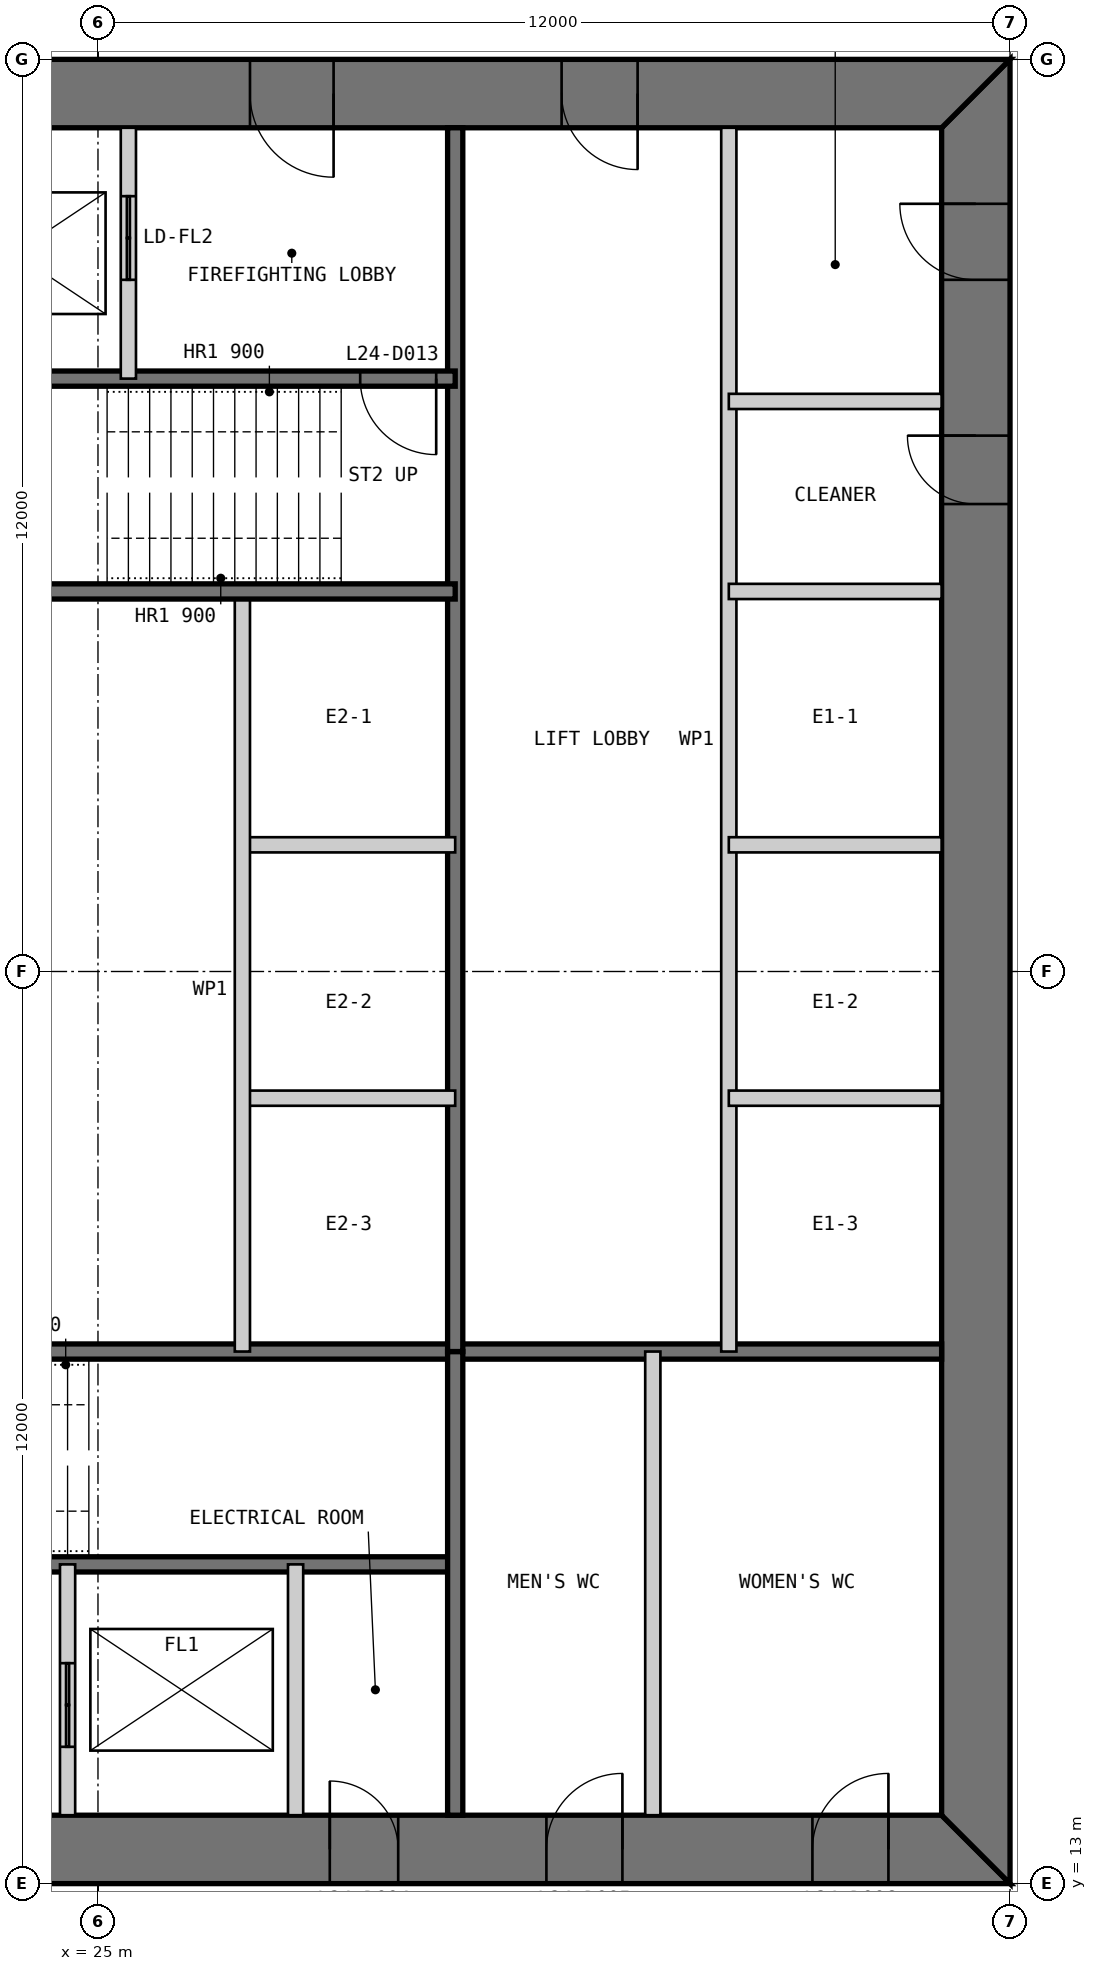
"""IFC4 building model, lengths in metres.
Left out: names, types, materials, properties, quantities, classifications, styles, units other than length and angle.
Written with IfcOpenShell. Run it as: python <this file> out.ifc"""

import sys

from ifc_helpers import new_model, si_unit, direction, frame, frame_2d, origin, place, context, subcontext, project, spatial, polyline, rectangle, outline, extrude, element, fill, save


model = new_model("IFC4")
c1 = context("Model", 3, precision=1e-05, world=origin(), true_north=direction((0.0, 1.0)))
c2 = subcontext(c1, "Body", "Model", "MODEL_VIEW")
j1 = project(units=[si_unit("LENGTHUNIT", "METRE"), si_unit("PLANEANGLEUNIT", "RADIAN")], contexts=[c1])
p1 = place(None, origin())
s1 = spatial("IfcSite", under=j1, at=p1, CompositionType="ELEMENT")
p2 = place(p1, origin())
s2 = spatial("IfcBuilding", under=s1, at=p2, CompositionType="ELEMENT")
p3 = place(p2, frame((0.0, 0.0, 106.4)))
s3 = spatial("IfcBuildingStorey", under=s2, at=p3, CompositionType="ELEMENT", Elevation=106.4)
p4 = place(p3, frame((13.0, 13.45, 0.0), z_axis=(0.0, 0.0, 1.0), x_axis=(1.0, 0.0, 0.0)))
e1 = element("IfcWall", 1, at=p4, inside=s3, PredefinedType="SHEAR", context=c2, shape_type="SweptSolid", body=[
    extrude(outline(polyline([(0.0, -0.45), (24.0, -0.45), (23.1, 0.45), (0.9, 0.45), (0.0, -0.45)])), origin(), (0.0, 0.0, 1.0), 4.0),
])
p5 = place(p4, frame((4.9, 0.0, 0.0)))
e2 = element("IfcOpeningElement", 2, at=p5, cuts=e1, PredefinedType="OPENING", context=c2, shape_type="SweptSolid", body=[
    extrude(rectangle(XDim=1.0, YDim=2.2, at=frame_2d((0.5, 1.1))), frame((0.0, 0.46, 0.0), z_axis=(0.0, -1.0, 0.0), x_axis=(1.0, 0.0, 0.0)), (0.0, 0.0, 1.0), 0.92),
])
p6 = place(p4, frame((8.9, 0.0, 0.0)))
e3 = element("IfcOpeningElement", 3, at=p6, cuts=e1, PredefinedType="OPENING", context=c2, shape_type="SweptSolid", body=[
    extrude(rectangle(XDim=1.1, YDim=2.2, at=frame_2d((0.55, 1.1))), frame((0.0, 0.46, 0.0), z_axis=(0.0, -1.0, 0.0), x_axis=(1.0, 0.0, 0.0)), (0.0, 0.0, 1.0), 0.92),
])
p7 = place(p4, frame((15.05, 0.0, 0.0)))
e4 = element("IfcOpeningElement", 4, at=p7, cuts=e1, PredefinedType="OPENING", context=c2, shape_type="SweptSolid", body=[
    extrude(rectangle(XDim=0.9, YDim=2.2, at=frame_2d((0.45, 1.1))), frame((0.0, 0.46, 0.0), z_axis=(0.0, -1.0, 0.0), x_axis=(1.0, 0.0, 0.0)), (0.0, 0.0, 1.0), 0.92),
])
p8 = place(p4, frame((17.9, 0.0, 0.0)))
e5 = element("IfcOpeningElement", 5, at=p8, cuts=e1, PredefinedType="OPENING", context=c2, shape_type="SweptSolid", body=[
    extrude(rectangle(XDim=1.0, YDim=2.2, at=frame_2d((0.5, 1.1))), frame((0.0, 0.46, 0.0), z_axis=(0.0, -1.0, 0.0), x_axis=(1.0, 0.0, 0.0)), (0.0, 0.0, 1.0), 0.92),
])
p9 = place(p4, frame((21.4, 0.0, 0.0)))
e6 = element("IfcOpeningElement", 6, at=p9, cuts=e1, PredefinedType="OPENING", context=c2, shape_type="SweptSolid", body=[
    extrude(rectangle(XDim=1.0, YDim=2.2, at=frame_2d((0.5, 1.1))), frame((0.0, 0.46, 0.0), z_axis=(0.0, -1.0, 0.0), x_axis=(1.0, 0.0, 0.0)), (0.0, 0.0, 1.0), 0.92),
])
p10 = place(p3, frame((36.55, 13.9, 0.0), z_axis=(0.0, 0.0, 1.0), x_axis=(0.0, 1.0, 0.0)))
e7 = element("IfcWall", 7, at=p10, inside=s3, PredefinedType="SHEAR", context=c2, shape_type="SweptSolid", body=[
    extrude(outline(polyline([(-0.9, -0.45), (23.1, -0.45), (22.2, 0.45), (0.0, 0.45), (-0.9, -0.45)])), origin(), (0.0, 0.0, 1.0), 4.0),
])
p11 = place(p10, frame((20.2, 0.0, 0.0)))
e8 = element("IfcOpeningElement", 8, at=p11, cuts=e7, PredefinedType="OPENING", context=c2, shape_type="SweptSolid", body=[
    extrude(rectangle(XDim=1.0, YDim=2.2, at=frame_2d((0.5, 1.1))), frame((0.0, 0.46, 0.0), z_axis=(0.0, -1.0, 0.0), x_axis=(1.0, 0.0, 0.0)), (0.0, 0.0, 1.0), 0.92),
])
p12 = place(p10, frame((17.25, 0.0, 0.0)))
e9 = element("IfcOpeningElement", 9, at=p12, cuts=e7, PredefinedType="OPENING", context=c2, shape_type="SweptSolid", body=[
    extrude(rectangle(XDim=0.9, YDim=2.2, at=frame_2d((0.45, 1.1))), frame((0.0, 0.46, 0.0), z_axis=(0.0, -1.0, 0.0), x_axis=(1.0, 0.0, 0.0)), (0.0, 0.0, 1.0), 0.92),
])
p13 = place(p3, frame((37.0, 36.55, 0.0), z_axis=(0.0, 0.0, 1.0), x_axis=(-1.0, 0.0, 0.0)))
e10 = element("IfcWall", 10, at=p13, inside=s3, PredefinedType="SHEAR", context=c2, shape_type="SweptSolid", body=[
    extrude(outline(polyline([(0.0, -0.45), (24.0, -0.45), (23.1, 0.45), (0.9, 0.45), (0.0, -0.45)])), origin(), (0.0, 0.0, 1.0), 4.0),
])
p14 = place(p13, frame((4.9, 0.0, 0.0)))
e11 = element("IfcOpeningElement", 11, at=p14, cuts=e10, PredefinedType="OPENING", context=c2, shape_type="SweptSolid", body=[
    extrude(rectangle(XDim=1.0, YDim=2.2, at=frame_2d((0.5, 1.1))), frame((0.0, 0.46, 0.0), z_axis=(0.0, -1.0, 0.0), x_axis=(1.0, 0.0, 0.0)), (0.0, 0.0, 1.0), 0.92),
])
p15 = place(p13, frame((8.9, 0.0, 0.0)))
e12 = element("IfcOpeningElement", 12, at=p15, cuts=e10, PredefinedType="OPENING", context=c2, shape_type="SweptSolid", body=[
    extrude(rectangle(XDim=1.1, YDim=2.2, at=frame_2d((0.55, 1.1))), frame((0.0, 0.46, 0.0), z_axis=(0.0, -1.0, 0.0), x_axis=(1.0, 0.0, 0.0)), (0.0, 0.0, 1.0), 0.92),
])
p16 = place(p13, frame((15.05, 0.0, 0.0)))
e13 = element("IfcOpeningElement", 13, at=p16, cuts=e10, PredefinedType="OPENING", context=c2, shape_type="SweptSolid", body=[
    extrude(rectangle(XDim=0.9, YDim=2.2, at=frame_2d((0.45, 1.1))), frame((0.0, 0.46, 0.0), z_axis=(0.0, -1.0, 0.0), x_axis=(1.0, 0.0, 0.0)), (0.0, 0.0, 1.0), 0.92),
])
p17 = place(p13, frame((17.9, 0.0, 0.0)))
e14 = element("IfcOpeningElement", 14, at=p17, cuts=e10, PredefinedType="OPENING", context=c2, shape_type="SweptSolid", body=[
    extrude(rectangle(XDim=1.0, YDim=2.2, at=frame_2d((0.5, 1.1))), frame((0.0, 0.46, 0.0), z_axis=(0.0, -1.0, 0.0), x_axis=(1.0, 0.0, 0.0)), (0.0, 0.0, 1.0), 0.92),
])
p18 = place(p13, frame((21.4, 0.0, 0.0)))
e15 = element("IfcOpeningElement", 15, at=p18, cuts=e10, PredefinedType="OPENING", context=c2, shape_type="SweptSolid", body=[
    extrude(rectangle(XDim=1.0, YDim=2.2, at=frame_2d((0.5, 1.1))), frame((0.0, 0.46, 0.0), z_axis=(0.0, -1.0, 0.0), x_axis=(1.0, 0.0, 0.0)), (0.0, 0.0, 1.0), 0.92),
])
p19 = place(p3, frame((20.3, 17.2, 0.0), z_axis=(0.0, 0.0, 1.0), x_axis=(1.0, 0.0, 0.0)))
e16 = element("IfcWall", 16, at=p19, inside=s3, PredefinedType="SOLIDWALL", context=c2, shape_type="SweptSolid", body=[
    extrude(rectangle(XDim=9.4, YDim=0.2, at=frame_2d((4.7, 0.0))), origin(), (0.0, 0.0, 1.0), 3.8),
])
p20 = place(p19, frame((0.25, 0.0, 0.0)))
e17 = element("IfcOpeningElement", 17, at=p20, cuts=e16, PredefinedType="OPENING", context=c2, shape_type="SweptSolid", body=[
    extrude(rectangle(XDim=1.0, YDim=2.2, at=frame_2d((0.5, 1.1))), frame((0.0, 0.11, 0.0), z_axis=(0.0, -1.0, 0.0), x_axis=(1.0, 0.0, 0.0)), (0.0, 0.0, 1.0), 0.22),
])
p21 = place(p3, frame((20.3, 20.0, 0.0), z_axis=(0.0, 0.0, 1.0), x_axis=(1.0, 0.0, 0.0)))
e18 = element("IfcWall", 18, at=p21, inside=s3, PredefinedType="SOLIDWALL", context=c2, shape_type="SweptSolid", body=[
    extrude(rectangle(XDim=15.8, YDim=0.2, at=frame_2d((7.9, 0.0))), origin(), (0.0, 0.0, 1.0), 3.8),
])
p22 = place(p3, frame((24.6, 13.9, 0.0), z_axis=(0.0, 0.0, 1.0), x_axis=(0.0, 1.0, 0.0)))
e19 = element("IfcWall", 19, at=p22, inside=s3, PredefinedType="PARTITIONING", context=c2, shape_type="SweptSolid", body=[
    extrude(rectangle(XDim=3.3, YDim=0.2, at=frame_2d((1.65, 0.0))), origin(), (0.0, 0.0, 1.0), 3.8),
])
p23 = place(p22, frame((0.9, 0.0, 0.0)))
e20 = element("IfcOpeningElement", 20, at=p23, cuts=e19, PredefinedType="OPENING", context=c2, shape_type="SweptSolid", body=[
    extrude(rectangle(XDim=1.1, YDim=2.2, at=frame_2d((0.55, 1.1))), frame((0.0, 0.11, 0.0), z_axis=(0.0, -1.0, 0.0), x_axis=(1.0, 0.0, 0.0)), (0.0, 0.0, 1.0), 0.22),
])
p24 = place(p3, frame((27.6, 13.9, 0.0), z_axis=(0.0, 0.0, 1.0), x_axis=(0.0, 1.0, 0.0)))
e21 = element("IfcWall", 21, at=p24, inside=s3, PredefinedType="PARTITIONING", context=c2, shape_type="SweptSolid", body=[
    extrude(rectangle(XDim=3.3, YDim=0.2, at=frame_2d((1.65, 0.0))), origin(), (0.0, 0.0, 1.0), 3.8),
])
p25 = place(p3, frame((29.7, 13.9, 0.0), z_axis=(0.0, 0.0, 1.0), x_axis=(0.0, 1.0, 0.0)))
e22 = element("IfcWall", 22, at=p25, inside=s3, PredefinedType="SOLIDWALL", context=c2, shape_type="SweptSolid", body=[
    extrude(rectangle(XDim=6.1, YDim=0.2, at=frame_2d((3.05, 0.0))), origin(), (0.0, 0.0, 1.0), 3.8),
])
p26 = place(p3, frame((32.3, 13.9, 0.0), z_axis=(0.0, 0.0, 1.0), x_axis=(0.0, 1.0, 0.0)))
e23 = element("IfcWall", 23, at=p26, inside=s3, PredefinedType="PARTITIONING", context=c2, shape_type="SweptSolid", body=[
    extrude(rectangle(XDim=6.1, YDim=0.2, at=frame_2d((3.05, 0.0))), origin(), (0.0, 0.0, 1.0), 3.8),
])
p27 = place(p3, frame((33.3, 36.1, 0.0), z_axis=(0.0, 0.0, 1.0), x_axis=(0.0, -1.0, 0.0)))
e24 = element("IfcWall", 24, at=p27, inside=s3, PredefinedType="PARTITIONING", context=c2, shape_type="SweptSolid", body=[
    extrude(rectangle(XDim=16.1, YDim=0.2, at=frame_2d((8.05, 0.0))), origin(), (0.0, 0.0, 1.0), 3.8),
])
p28 = place(p3, frame((29.7, 36.1, 0.0), z_axis=(0.0, 0.0, 1.0), x_axis=(0.0, -1.0, 0.0)))
e25 = element("IfcWall", 25, at=p28, inside=s3, PredefinedType="SOLIDWALL", context=c2, shape_type="SweptSolid", body=[
    extrude(rectangle(XDim=16.1, YDim=0.2, at=frame_2d((8.05, 0.0))), origin(), (0.0, 0.0, 1.0), 3.8),
])
for number, where, z_axis, x_axis in (
    (26, (36.1, 30.0, 0.0), (0.0, 0.0, 1.0), (-1.0, 0.0, 0.0)),
    (27, (36.1, 26.667, 0.0), (0.0, 0.0, 1.0), (-1.0, 0.0, 0.0)),
    (28, (36.1, 23.333, 0.0), (0.0, 0.0, 1.0), (-1.0, 0.0, 0.0)),
    (29, (29.7, 26.667, 0.0), (0.0, 0.0, 1.0), (-1.0, 0.0, 0.0)),
    (30, (29.7, 23.333, 0.0), (0.0, 0.0, 1.0), (-1.0, 0.0, 0.0)),
):
    element("IfcWall", number, at=place(p3, frame(where, z_axis=z_axis, x_axis=x_axis)), inside=s3, PredefinedType="PARTITIONING", context=c2, shape_type="SweptSolid", body=[
        extrude(rectangle(XDim=2.8, YDim=0.2, at=frame_2d((1.4, 0.0))), origin(), (0.0, 0.0, 1.0), 3.8),
    ])
p29 = place(p3, frame((26.9, 30.0, 0.0), z_axis=(0.0, 0.0, 1.0), x_axis=(0.0, -1.0, 0.0)))
e31 = element("IfcWall", 31, at=p29, inside=s3, PredefinedType="PARTITIONING", context=c2, shape_type="SweptSolid", body=[
    extrude(rectangle(XDim=10.0, YDim=0.2, at=frame_2d((5.0, 0.0))), origin(), (0.0, 0.0, 1.0), 3.8),
])
p30 = place(p3, frame((29.7, 32.8, 0.0), z_axis=(0.0, 0.0, 1.0), x_axis=(-1.0, 0.0, 0.0)))
e32 = element("IfcWall", 32, at=p30, inside=s3, PredefinedType="SOLIDWALL", context=c2, shape_type="SweptSolid", body=[
    extrude(rectangle(XDim=9.4, YDim=0.2, at=frame_2d((4.7, 0.0))), origin(), (0.0, 0.0, 1.0), 3.8),
])
p31 = place(p30, frame((0.25, 0.0, 0.0)))
e33 = element("IfcOpeningElement", 33, at=p31, cuts=e32, PredefinedType="OPENING", context=c2, shape_type="SweptSolid", body=[
    extrude(rectangle(XDim=1.0, YDim=2.2, at=frame_2d((0.5, 1.1))), frame((0.0, 0.11, 0.0), z_axis=(0.0, -1.0, 0.0), x_axis=(1.0, 0.0, 0.0)), (0.0, 0.0, 1.0), 0.22),
])
p32 = place(p3, frame((29.7, 30.0, 0.0), z_axis=(0.0, 0.0, 1.0), x_axis=(-1.0, 0.0, 0.0)))
e34 = element("IfcWall", 34, at=p32, inside=s3, PredefinedType="SOLIDWALL", context=c2, shape_type="SweptSolid", body=[
    extrude(rectangle(XDim=15.8, YDim=0.2, at=frame_2d((7.9, 0.0))), origin(), (0.0, 0.0, 1.0), 3.8),
])
p33 = place(p3, frame((25.4, 36.1, 0.0), z_axis=(0.0, 0.0, 1.0), x_axis=(0.0, -1.0, 0.0)))
e35 = element("IfcWall", 35, at=p33, inside=s3, PredefinedType="PARTITIONING", context=c2, shape_type="SweptSolid", body=[
    extrude(rectangle(XDim=3.3, YDim=0.2, at=frame_2d((1.65, 0.0))), origin(), (0.0, 0.0, 1.0), 3.8),
])
p34 = place(p33, frame((0.9, 0.0, 0.0)))
e36 = element("IfcOpeningElement", 36, at=p34, cuts=e35, PredefinedType="OPENING", context=c2, shape_type="SweptSolid", body=[
    extrude(rectangle(XDim=1.1, YDim=2.2, at=frame_2d((0.55, 1.1))), frame((0.0, 0.11, 0.0), z_axis=(0.0, -1.0, 0.0), x_axis=(1.0, 0.0, 0.0)), (0.0, 0.0, 1.0), 0.22),
])
p35 = place(p3, frame((36.1, 32.5, 0.0), z_axis=(0.0, 0.0, 1.0), x_axis=(-1.0, 0.0, 0.0)))
e37 = element("IfcWall", 37, at=p35, inside=s3, PredefinedType="PARTITIONING", context=c2, shape_type="SweptSolid", body=[
    extrude(rectangle(XDim=2.8, YDim=0.2, at=frame_2d((1.4, 0.0))), origin(), (0.0, 0.0, 1.0), 3.8),
])
p36 = place(p7, origin())
e38 = element("IfcDoor", 38, at=p36, inside=s3, OperationType="SINGLE_SWING_LEFT", PredefinedType="DOOR", context=c2, shape_type="SweptSolid", body=[
    extrude(rectangle(XDim=0.9, YDim=2.2, at=frame_2d((0.45, 1.1))), frame((0.0, 0.025, 0.0), z_axis=(0.0, -1.0, 0.0), x_axis=(1.0, 0.0, 0.0)), (0.0, 0.0, 1.0), 0.05),
    extrude(outline(polyline([(0.0, 0.0), (0.04, 0.0), (0.04, 2.16), (0.86, 2.16), (0.86, 0.0), (0.9, 0.0), (0.9, 2.2), (0.0, 2.2), (0.0, 0.0)])), frame((0.0, 0.3, 0.0), z_axis=(0.0, -1.0, 0.0), x_axis=(1.0, 0.0, 0.0)), (0.0, 0.0, 1.0), 0.6),
])
fill(e4, e38)
p37 = place(p8, origin())
e39 = element("IfcDoor", 39, at=p37, inside=s3, OperationType="SINGLE_SWING_RIGHT", PredefinedType="DOOR", context=c2, shape_type="SweptSolid", body=[
    extrude(rectangle(XDim=1.0, YDim=2.2, at=frame_2d((0.5, 1.1))), frame((0.0, 0.025, 0.0), z_axis=(0.0, -1.0, 0.0), x_axis=(1.0, 0.0, 0.0)), (0.0, 0.0, 1.0), 0.05),
    extrude(outline(polyline([(0.0, 0.0), (0.04, 0.0), (0.04, 2.16), (0.96, 2.16), (0.96, 0.0), (1.0, 0.0), (1.0, 2.2), (0.0, 2.2), (0.0, 0.0)])), frame((0.0, 0.3, 0.0), z_axis=(0.0, -1.0, 0.0), x_axis=(1.0, 0.0, 0.0)), (0.0, 0.0, 1.0), 0.6),
])
fill(e5, e39)
p38 = place(p9, origin())
e40 = element("IfcDoor", 40, at=p38, inside=s3, OperationType="SINGLE_SWING_RIGHT", PredefinedType="DOOR", context=c2, shape_type="SweptSolid", body=[
    extrude(rectangle(XDim=1.0, YDim=2.2, at=frame_2d((0.5, 1.1))), frame((0.0, 0.025, 0.0), z_axis=(0.0, -1.0, 0.0), x_axis=(1.0, 0.0, 0.0)), (0.0, 0.0, 1.0), 0.05),
    extrude(outline(polyline([(0.0, 0.0), (0.04, 0.0), (0.04, 2.16), (0.96, 2.16), (0.96, 0.0), (1.0, 0.0), (1.0, 2.2), (0.0, 2.2), (0.0, 0.0)])), frame((0.0, 0.3, 0.0), z_axis=(0.0, -1.0, 0.0), x_axis=(1.0, 0.0, 0.0)), (0.0, 0.0, 1.0), 0.6),
])
fill(e6, e40)
p39 = place(p14, origin())
e41 = element("IfcDoor", 41, at=p39, inside=s3, OperationType="SINGLE_SWING_LEFT", PredefinedType="DOOR", context=c2, shape_type="SweptSolid", body=[
    extrude(rectangle(XDim=1.0, YDim=2.2, at=frame_2d((0.5, 1.1))), frame((0.0, 0.025, 0.0), z_axis=(0.0, -1.0, 0.0), x_axis=(1.0, 0.0, 0.0)), (0.0, 0.0, 1.0), 0.05),
    extrude(outline(polyline([(0.0, 0.0), (0.04, 0.0), (0.04, 2.16), (0.96, 2.16), (0.96, 0.0), (1.0, 0.0), (1.0, 2.2), (0.0, 2.2), (0.0, 0.0)])), frame((0.0, 0.3, 0.0), z_axis=(0.0, -1.0, 0.0), x_axis=(1.0, 0.0, 0.0)), (0.0, 0.0, 1.0), 0.6),
])
fill(e11, e41)
p40 = place(p15, origin())
e42 = element("IfcDoor", 42, at=p40, inside=s3, OperationType="SINGLE_SWING_LEFT", PredefinedType="DOOR", context=c2, shape_type="SweptSolid", body=[
    extrude(rectangle(XDim=1.1, YDim=2.2, at=frame_2d((0.55, 1.1))), frame((0.0, 0.025, 0.0), z_axis=(0.0, -1.0, 0.0), x_axis=(1.0, 0.0, 0.0)), (0.0, 0.0, 1.0), 0.05),
    extrude(outline(polyline([(0.0, 0.0), (0.04, 0.0), (0.04, 2.16), (1.06, 2.16), (1.06, 0.0), (1.1, 0.0), (1.1, 2.2), (0.0, 2.2), (0.0, 0.0)])), frame((0.0, 0.3, 0.0), z_axis=(0.0, -1.0, 0.0), x_axis=(1.0, 0.0, 0.0)), (0.0, 0.0, 1.0), 0.6),
])
fill(e12, e42)
p41 = place(p31, origin())
e43 = element("IfcDoor", 43, at=p41, inside=s3, OperationType="SINGLE_SWING_LEFT", PredefinedType="DOOR", context=c2, shape_type="SweptSolid", body=[
    extrude(rectangle(XDim=1.0, YDim=2.2, at=frame_2d((0.5, 1.1))), frame((0.0, 0.025, 0.0), z_axis=(0.0, -1.0, 0.0), x_axis=(1.0, 0.0, 0.0)), (0.0, 0.0, 1.0), 0.05),
])
fill(e33, e43)
p42 = place(p11, origin())
e44 = element("IfcDoor", 44, at=p42, inside=s3, OperationType="SINGLE_SWING_RIGHT", PredefinedType="DOOR", context=c2, shape_type="SweptSolid", body=[
    extrude(rectangle(XDim=1.0, YDim=2.2, at=frame_2d((0.5, 1.1))), frame((0.0, 0.025, 0.0), z_axis=(0.0, -1.0, 0.0), x_axis=(1.0, 0.0, 0.0)), (0.0, 0.0, 1.0), 0.05),
    extrude(outline(polyline([(0.0, 0.0), (0.04, 0.0), (0.04, 2.16), (0.96, 2.16), (0.96, 0.0), (1.0, 0.0), (1.0, 2.2), (0.0, 2.2), (0.0, 0.0)])), frame((0.0, 0.3, 0.0), z_axis=(0.0, -1.0, 0.0), x_axis=(1.0, 0.0, 0.0)), (0.0, 0.0, 1.0), 0.6),
])
fill(e8, e44)
p43 = place(p12, origin())
e45 = element("IfcDoor", 45, at=p43, inside=s3, OperationType="SINGLE_SWING_RIGHT", PredefinedType="DOOR", context=c2, shape_type="SweptSolid", body=[
    extrude(rectangle(XDim=0.9, YDim=2.2, at=frame_2d((0.45, 1.1))), frame((0.0, 0.025, 0.0), z_axis=(0.0, -1.0, 0.0), x_axis=(1.0, 0.0, 0.0)), (0.0, 0.0, 1.0), 0.05),
    extrude(outline(polyline([(0.0, 0.0), (0.04, 0.0), (0.04, 2.16), (0.86, 2.16), (0.86, 0.0), (0.9, 0.0), (0.9, 2.2), (0.0, 2.2), (0.0, 0.0)])), frame((0.0, 0.3, 0.0), z_axis=(0.0, -1.0, 0.0), x_axis=(1.0, 0.0, 0.0)), (0.0, 0.0, 1.0), 0.6),
])
fill(e9, e45)
p44 = place(p23, origin())
e46 = element("IfcDoor", 46, at=p44, inside=s3, OperationType="DOUBLE_DOOR_SLIDING", PredefinedType="DOOR", context=c2, shape_type="SweptSolid", body=[
    extrude(rectangle(XDim=1.1, YDim=2.2, at=frame_2d((0.55, 1.1))), frame((0.0, 0.025, 0.0), z_axis=(0.0, -1.0, 0.0), x_axis=(1.0, 0.0, 0.0)), (0.0, 0.0, 1.0), 0.05),
])
fill(e20, e46)
p45 = place(p34, origin())
e47 = element("IfcDoor", 47, at=p45, inside=s3, OperationType="DOUBLE_DOOR_SLIDING", PredefinedType="DOOR", context=c2, shape_type="SweptSolid", body=[
    extrude(rectangle(XDim=1.1, YDim=2.2, at=frame_2d((0.55, 1.1))), frame((0.0, 0.025, 0.0), z_axis=(0.0, -1.0, 0.0), x_axis=(1.0, 0.0, 0.0)), (0.0, 0.0, 1.0), 0.05),
])
fill(e36, e47)
save(model, sys.argv[1])
